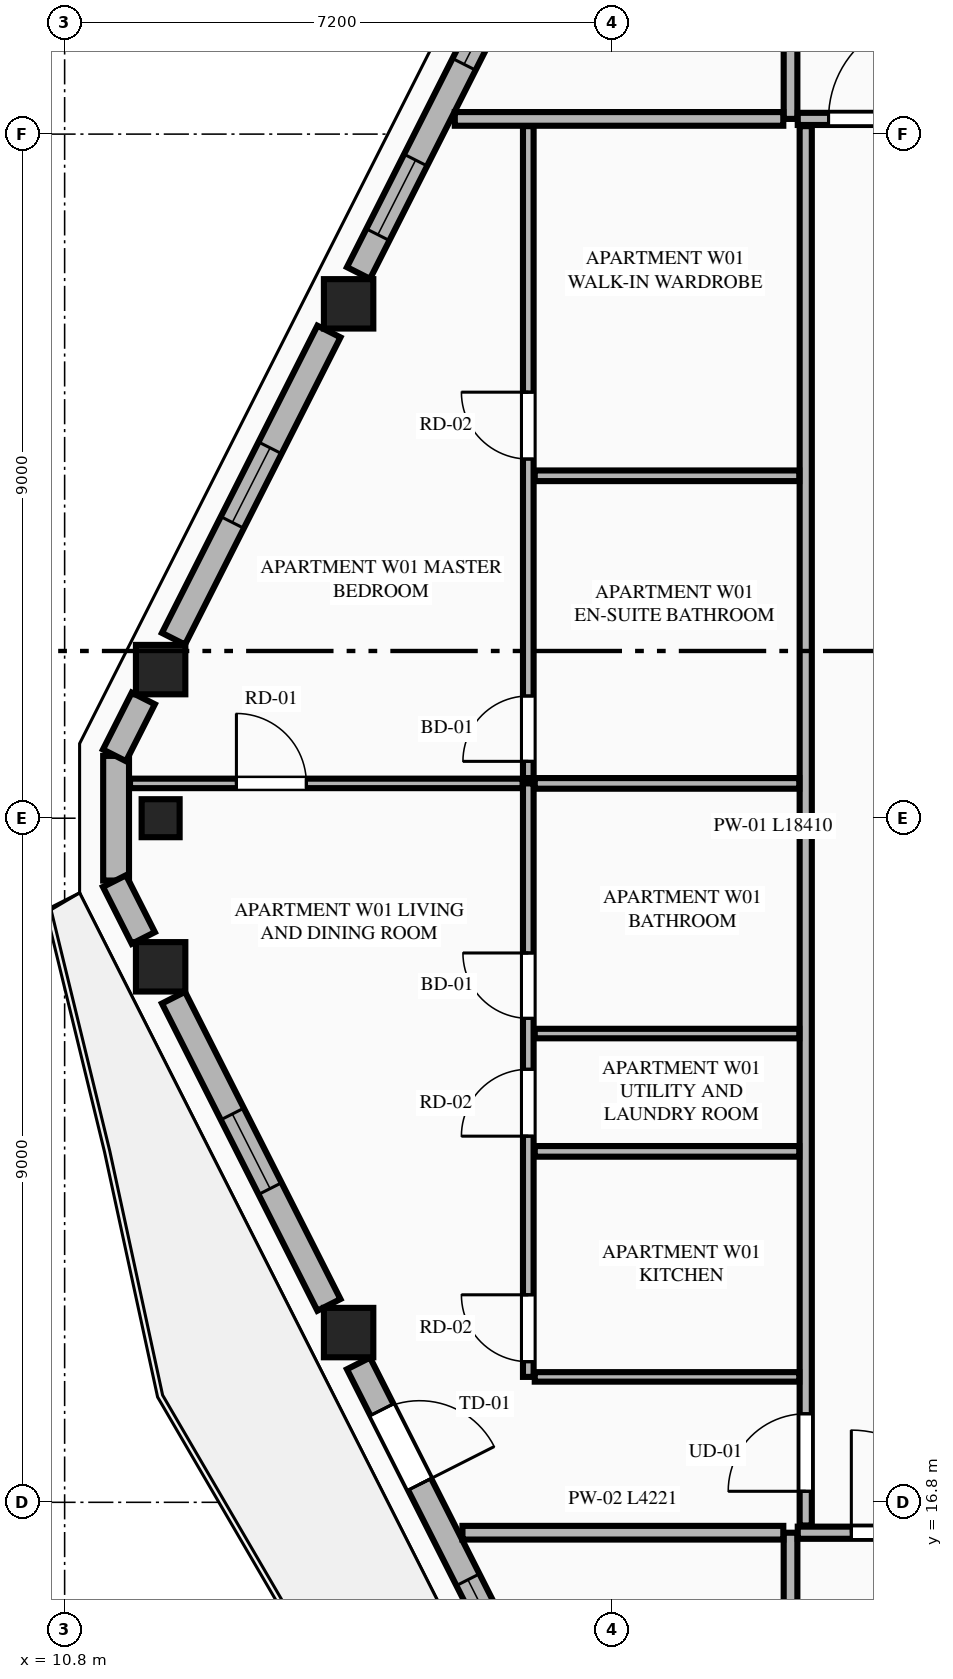
"""IFC4 building model, lengths in metres.
Left out: names, types, materials, properties, quantities, classifications, styles, units other than length and angle.
Written with IfcOpenShell. Run it as: python <this file> out.ifc"""

import sys

from ifc_helpers import new_model, si_unit, direction, frame, frame_2d, origin, origin_2d, place, context, subcontext, project, spatial, rectangle, extrude, element, fill, save


model = new_model("IFC4")
c1 = context("Model", 3, precision=1e-05, world=origin(), true_north=direction((0.0, 1.0)))
c2 = subcontext(c1, "Body", "Model", "MODEL_VIEW")
j1 = project(units=[si_unit("LENGTHUNIT", "METRE"), si_unit("PLANEANGLEUNIT", "RADIAN")], contexts=[c1])
p1 = place(None, origin())
s1 = spatial("IfcSite", under=j1, at=p1, CompositionType="ELEMENT")
p2 = place(p1, origin())
s2 = spatial("IfcBuilding", under=s1, at=p2, CompositionType="ELEMENT")
p3 = place(p2, frame((0.0, 0.0, 291.5)))
s3 = spatial("IfcBuildingStorey", under=s2, at=p3, CompositionType="ELEMENT", Elevation=291.5)
for number, where, z_axis, x_axis in (
    (1, (14.536, 32.567, 0.0), (0.0, 0.0, 1.0), (1.0, 0.0, 0.0)),
    (2, (12.063, 27.755, 0.0), (0.0, 0.0, 1.0), (1.0, 0.0, 0.0)),
    (3, (12.063, 23.845, 0.0), (0.0, 0.0, 1.0), (1.0, 0.0, 0.0)),
    (4, (14.536, 19.033, 0.0), (0.0, 0.0, 1.0), (1.0, 0.0, 0.0)),
):
    element("IfcColumn", number, at=place(p3, frame(where, z_axis=z_axis, x_axis=x_axis)), inside=s3, PredefinedType="COLUMN", context=c2, shape_type="SweptSolid", body=[
        extrude(rectangle(XDim=0.65, YDim=0.65, at=origin_2d()), origin(), (0.0, 0.0, 1.0), 4.0),
    ])
p4 = place(p3, frame((12.063, 25.8, 0.0), z_axis=(0.0, 0.0, 1.0), x_axis=(0.0, -1.0, 0.0)))
e5 = element("IfcColumn", 5, at=p4, inside=s3, PredefinedType="PILASTER", context=c2, shape_type="SweptSolid", body=[
    extrude(rectangle(XDim=0.5, YDim=0.35, at=origin_2d()), origin(), (0.0, 0.0, 1.0), 4.0),
])
p5 = place(p3, frame((11.477, 26.62, 0.0), z_axis=(0.0, 0.0, 1.0), x_axis=(0.0, -1.0, 0.0)))
e6 = element("IfcWall", 6, at=p5, inside=s3, PredefinedType="STANDARD", context=c2, shape_type="SweptSolid", body=[
    extrude(rectangle(XDim=1.64, YDim=0.34, at=frame_2d((0.82, 0.0))), origin(), (0.0, 0.0, 1.0), 3.8),
])
p6 = place(p3, frame((16.798, 37.187, 0.0), z_axis=(0.0, 0.0, 1.0), x_axis=(-0.451447516904, -0.892297674255, 0.0)))
e7 = element("IfcWall", 7, at=p6, inside=s3, PredefinedType="STANDARD", context=c2, shape_type="SweptSolid", body=[
    extrude(rectangle(XDim=4.723, YDim=0.34, at=frame_2d((2.361, 0.0))), origin(), (0.0, 0.0, 1.0), 2.99),
])
p7 = place(p6, frame((0.546, 0.0, 0.75)))
e8 = element("IfcOpeningElement", 8, at=p7, cuts=e7, PredefinedType="OPENING", context=c2, shape_type="SweptSolid", body=[
    extrude(rectangle(XDim=1.1, YDim=2.0, at=frame_2d((0.55, 1.0))), frame((0.0, 0.18, 0.0), z_axis=(0.0, -1.0, 0.0), x_axis=(1.0, 0.0, 0.0)), (0.0, 0.0, 1.0), 0.36),
])
p8 = place(p6, frame((3.058, 0.0, 0.75)))
e9 = element("IfcOpeningElement", 9, at=p8, cuts=e7, PredefinedType="OPENING", context=c2, shape_type="SweptSolid", body=[
    extrude(rectangle(XDim=1.1, YDim=2.0, at=frame_2d((0.55, 1.0))), frame((0.0, 0.18, 0.0), z_axis=(0.0, -1.0, 0.0), x_axis=(1.0, 0.0, 0.0)), (0.0, 0.0, 1.0), 0.36),
])
p9 = place(p3, frame((14.277, 32.203, 0.0), z_axis=(0.0, 0.0, 1.0), x_axis=(-0.45147697324, -0.892282770558, 0.0)))
e10 = element("IfcWall", 10, at=p9, inside=s3, PredefinedType="STANDARD", context=c2, shape_type="SweptSolid", body=[
    extrude(rectangle(XDim=4.53, YDim=0.34, at=frame_2d((2.265, 0.0))), origin(), (0.0, 0.0, 1.0), 2.99),
])
p10 = place(p9, frame((1.715, 0.0, 0.75)))
e11 = element("IfcOpeningElement", 11, at=p10, cuts=e10, PredefinedType="OPENING", context=c2, shape_type="SweptSolid", body=[
    extrude(rectangle(XDim=1.1, YDim=2.0, at=frame_2d((0.55, 1.0))), frame((0.0, 0.18, 0.0), z_axis=(0.0, -1.0, 0.0), x_axis=(1.0, 0.0, 0.0)), (0.0, 0.0, 1.0), 0.36),
])
p11 = place(p3, frame((11.835, 27.376, 0.0), z_axis=(0.0, 0.0, 1.0), x_axis=(-0.45139691133, -0.892323275748, 0.0)))
e12 = element("IfcWall", 12, at=p11, inside=s3, PredefinedType="STANDARD", context=c2, shape_type="SweptSolid", body=[
    extrude(rectangle(XDim=0.839, YDim=0.34, at=frame_2d((0.42, 0.0))), origin(), (0.0, 0.0, 1.0), 3.8),
])
p12 = place(p3, frame((11.456, 24.973, 0.0), z_axis=(0.0, 0.0, 1.0), x_axis=(0.4515140893, -0.892263989615, 0.0)))
e13 = element("IfcWall", 13, at=p12, inside=s3, PredefinedType="STANDARD", context=c2, shape_type="SweptSolid", body=[
    extrude(rectangle(XDim=0.839, YDim=0.34, at=frame_2d((0.419, 0.0))), origin(), (0.0, 0.0, 1.0), 3.8),
])
p13 = place(p3, frame((12.232, 23.439, 0.0), z_axis=(0.0, 0.0, 1.0), x_axis=(0.45147697324, -0.892282770558, 0.0)))
e14 = element("IfcWall", 14, at=p13, inside=s3, PredefinedType="STANDARD", context=c2, shape_type="SweptSolid", body=[
    extrude(rectangle(XDim=4.53, YDim=0.34, at=frame_2d((2.265, 0.0))), origin(), (0.0, 0.0, 1.0), 2.99),
])
p14 = place(p13, frame((1.715, 0.0, 0.75)))
e15 = element("IfcOpeningElement", 15, at=p14, cuts=e14, PredefinedType="OPENING", context=c2, shape_type="SweptSolid", body=[
    extrude(rectangle(XDim=1.1, YDim=2.0, at=frame_2d((0.55, 1.0))), frame((0.0, 0.18, 0.0), z_axis=(0.0, -1.0, 0.0), x_axis=(1.0, 0.0, 0.0)), (0.0, 0.0, 1.0), 0.36),
])
p15 = place(p3, frame((14.666, 18.627, 0.0), z_axis=(0.0, 0.0, 1.0), x_axis=(0.451468341582, -0.892287137949, 0.0)))
e16 = element("IfcWall", 16, at=p15, inside=s3, PredefinedType="STANDARD", context=c2, shape_type="SweptSolid", body=[
    extrude(rectangle(XDim=4.723, YDim=0.34, at=frame_2d((2.361, 0.0))), origin(), (0.0, 0.0, 1.0), 2.99),
])
p16 = place(p15, frame((0.682, 0.0, 0.0)))
e17 = element("IfcOpeningElement", 17, at=p16, cuts=e16, PredefinedType="OPENING", context=c2, shape_type="SweptSolid", body=[
    extrude(rectangle(XDim=1.1, YDim=2.25, at=frame_2d((0.55, 1.125))), frame((0.0, 0.18, 0.0), z_axis=(0.0, -1.0, 0.0), x_axis=(1.0, 0.0, 0.0)), (0.0, 0.0, 1.0), 0.36),
])
p17 = place(p15, frame((3.189, 0.0, 0.75)))
e18 = element("IfcOpeningElement", 18, at=p17, cuts=e16, PredefinedType="OPENING", context=c2, shape_type="SweptSolid", body=[
    extrude(rectangle(XDim=1.1, YDim=2.0, at=frame_2d((0.55, 1.0))), frame((0.0, 0.18, 0.0), z_axis=(0.0, -1.0, 0.0), x_axis=(1.0, 0.0, 0.0)), (0.0, 0.0, 1.0), 0.36),
])
p18 = place(p3, frame((20.35, 8.119, 0.0), z_axis=(0.0, 0.0, 1.0), x_axis=(0.0, 1.0, 0.0)))
e19 = element("IfcWall", 19, at=p18, inside=s3, PredefinedType="PARTITIONING", context=c2, shape_type="SweptSolid", body=[
    extrude(rectangle(XDim=8.281, YDim=0.18, at=frame_2d((4.141, 0.0))), origin(), (0.0, 0.0, 1.0), 3.8),
])
p19 = place(p3, frame((20.445, 16.4, 0.0), z_axis=(0.0, 0.0, 1.0), x_axis=(1.0, 0.0, 0.0)))
e20 = element("IfcWall", 20, at=p19, inside=s3, PredefinedType="PARTITIONING", context=c2, shape_type="SweptSolid", body=[
    extrude(rectangle(XDim=23.91, YDim=0.16, at=frame_2d((11.955, 0.0))), origin(), (0.0, 0.0, 1.0), 3.8),
])
p20 = place(p19, frame((0.705, 0.0, 0.0)))
e21 = element("IfcOpeningElement", 21, at=p20, cuts=e20, PredefinedType="OPENING", context=c2, shape_type="SweptSolid", body=[
    extrude(rectangle(XDim=1.35, YDim=2.35, at=frame_2d((0.675, 1.175))), frame((0.0, 0.09, 0.0), z_axis=(0.0, -1.0, 0.0), x_axis=(1.0, 0.0, 0.0)), (0.0, 0.0, 1.0), 0.18),
])
p21 = place(p3, frame((20.35, 35.0, 0.0), z_axis=(0.0, 0.0, 1.0), x_axis=(0.0, 1.0, 0.0)))
e22 = element("IfcWall", 22, at=p21, inside=s3, PredefinedType="PARTITIONING", context=c2, shape_type="SweptSolid", body=[
    extrude(rectangle(XDim=8.481, YDim=0.18, at=frame_2d((4.24, 0.0))), origin(), (0.0, 0.0, 1.0), 3.8),
])
p22 = place(p3, frame((20.445, 35.0, 0.0), z_axis=(0.0, 0.0, 1.0), x_axis=(1.0, 0.0, 0.0)))
e23 = element("IfcWall", 23, at=p22, inside=s3, PredefinedType="PARTITIONING", context=c2, shape_type="SweptSolid", body=[
    extrude(rectangle(XDim=23.91, YDim=0.16, at=frame_2d((11.955, 0.0))), origin(), (0.0, 0.0, 1.0), 3.8),
])
p23 = place(p22, frame((0.405, 0.0, 0.0)))
e24 = element("IfcOpeningElement", 24, at=p23, cuts=e23, PredefinedType="OPENING", context=c2, shape_type="SweptSolid", body=[
    extrude(rectangle(XDim=1.35, YDim=2.35, at=frame_2d((0.675, 1.175))), frame((0.0, 0.09, 0.0), z_axis=(0.0, -1.0, 0.0), x_axis=(1.0, 0.0, 0.0)), (0.0, 0.0, 1.0), 0.18),
])
p24 = place(p3, frame((16.034, 16.4, 0.0), z_axis=(0.0, 0.0, 1.0), x_axis=(1.0, 0.0, 0.0)))
e25 = element("IfcWall", 25, at=p24, inside=s3, PredefinedType="PARTITIONING", context=c2, shape_type="SweptSolid", body=[
    extrude(rectangle(XDim=4.221, YDim=0.18, at=frame_2d((2.11, 0.0))), origin(), (0.0, 0.0, 1.0), 3.8),
])
p25 = place(p3, frame((15.933, 35.0, 0.0), z_axis=(0.0, 0.0, 1.0), x_axis=(1.0, 0.0, 0.0)))
e26 = element("IfcWall", 26, at=p25, inside=s3, PredefinedType="PARTITIONING", context=c2, shape_type="SweptSolid", body=[
    extrude(rectangle(XDim=4.322, YDim=0.18, at=frame_2d((2.161, 0.0))), origin(), (0.0, 0.0, 1.0), 3.8),
])
p26 = place(p3, frame((20.55, 16.495, 0.0), z_axis=(0.0, 0.0, 1.0), x_axis=(0.0, 1.0, 0.0)))
e27 = element("IfcWall", 27, at=p26, inside=s3, PredefinedType="PARTITIONING", context=c2, shape_type="SweptSolid", body=[
    extrude(rectangle(XDim=18.41, YDim=0.16, at=frame_2d((9.205, 0.0))), origin(), (0.0, 0.0, 1.0), 3.487),
])
p27 = place(p26, frame((0.45, 0.0, 0.0)))
e28 = element("IfcOpeningElement", 28, at=p27, cuts=e27, PredefinedType="OPENING", context=c2, shape_type="SweptSolid", body=[
    extrude(rectangle(XDim=1.02, YDim=2.25, at=frame_2d((0.51, 1.125))), frame((0.0, 0.09, 0.0), z_axis=(0.0, -1.0, 0.0), x_axis=(1.0, 0.0, 0.0)), (0.0, 0.0, 1.0), 0.18),
])
p28 = place(p3, frame((16.985, 18.45, 0.0), z_axis=(0.0, 0.0, 1.0), x_axis=(1.0, 0.0, 0.0)))
e29 = element("IfcWall", 29, at=p28, inside=s3, PredefinedType="PARTITIONING", context=c2, shape_type="SweptSolid", body=[
    extrude(rectangle(XDim=3.48, YDim=0.125, at=frame_2d((1.74, 0.0))), origin(), (0.0, 0.0, 1.0), 3.8),
])
p29 = place(p3, frame((16.9, 18.45, 0.0), z_axis=(0.0, 0.0, 1.0), x_axis=(0.0, 1.0, 0.0)))
e30 = element("IfcWall", 30, at=p29, inside=s3, PredefinedType="PLUMBINGWALL", context=c2, shape_type="SweptSolid", body=[
    extrude(rectangle(XDim=7.808, YDim=0.14, at=frame_2d((3.904, 0.0))), origin(), (0.0, 0.0, 1.0), 3.8),
])
p30 = place(p29, frame((0.2, 0.0, 0.0)))
e31 = element("IfcOpeningElement", 31, at=p30, cuts=e30, PredefinedType="OPENING", context=c2, shape_type="SweptSolid", body=[
    extrude(rectangle(XDim=0.88, YDim=2.15, at=frame_2d((0.44, 1.075))), frame((0.0, 0.08, 0.0), z_axis=(0.0, -1.0, 0.0), x_axis=(1.0, 0.0, 0.0)), (0.0, 0.0, 1.0), 0.16),
])
p31 = place(p29, frame((3.167, 0.0, 0.0)))
e32 = element("IfcOpeningElement", 32, at=p31, cuts=e30, PredefinedType="OPENING", context=c2, shape_type="SweptSolid", body=[
    extrude(rectangle(XDim=0.88, YDim=2.15, at=frame_2d((0.44, 1.075))), frame((0.0, 0.08, 0.0), z_axis=(0.0, -1.0, 0.0), x_axis=(1.0, 0.0, 0.0)), (0.0, 0.0, 1.0), 0.16),
])
p32 = place(p29, frame((4.717, 0.0, 0.0)))
e33 = element("IfcOpeningElement", 33, at=p32, cuts=e30, PredefinedType="OPENING", context=c2, shape_type="SweptSolid", body=[
    extrude(rectangle(XDim=0.86, YDim=2.1, at=frame_2d((0.43, 1.05))), frame((0.0, 0.08, 0.0), z_axis=(0.0, -1.0, 0.0), x_axis=(1.0, 0.0, 0.0)), (0.0, 0.0, 1.0), 0.16),
])
p33 = place(p3, frame((16.9, 26.328, 0.0), z_axis=(0.0, 0.0, 1.0), x_axis=(0.0, 1.0, 0.0)))
e34 = element("IfcWall", 34, at=p33, inside=s3, PredefinedType="PLUMBINGWALL", context=c2, shape_type="SweptSolid", body=[
    extrude(rectangle(XDim=8.577, YDim=0.14, at=frame_2d((4.289, 0.0))), origin(), (0.0, 0.0, 1.0), 3.8),
])
p34 = place(p33, frame((0.22, 0.0, 0.0)))
e35 = element("IfcOpeningElement", 35, at=p34, cuts=e34, PredefinedType="OPENING", context=c2, shape_type="SweptSolid", body=[
    extrude(rectangle(XDim=0.86, YDim=2.1, at=frame_2d((0.43, 1.05))), frame((0.0, 0.08, 0.0), z_axis=(0.0, -1.0, 0.0), x_axis=(1.0, 0.0, 0.0)), (0.0, 0.0, 1.0), 0.16),
])
p35 = place(p33, frame((4.197, 0.0, 0.0)))
e36 = element("IfcOpeningElement", 36, at=p35, cuts=e34, PredefinedType="OPENING", context=c2, shape_type="SweptSolid", body=[
    extrude(rectangle(XDim=0.88, YDim=2.15, at=frame_2d((0.44, 1.075))), frame((0.0, 0.08, 0.0), z_axis=(0.0, -1.0, 0.0), x_axis=(1.0, 0.0, 0.0)), (0.0, 0.0, 1.0), 0.16),
])
p36 = place(p3, frame((16.985, 26.258, 0.0), z_axis=(0.0, 0.0, 1.0), x_axis=(1.0, 0.0, 0.0)))
e37 = element("IfcWall", 37, at=p36, inside=s3, PredefinedType="PLUMBINGWALL", context=c2, shape_type="SweptSolid", body=[
    extrude(rectangle(XDim=3.48, YDim=0.14, at=frame_2d((1.74, 0.0))), origin(), (0.0, 0.0, 1.0), 3.8),
])
p37 = place(p3, frame((11.66, 26.258, 0.0), z_axis=(0.0, 0.0, 1.0), x_axis=(1.0, 0.0, 0.0)))
e38 = element("IfcWall", 38, at=p37, inside=s3, PredefinedType="PARTITIONING", context=c2, shape_type="SweptSolid", body=[
    extrude(rectangle(XDim=5.165, YDim=0.125, at=frame_2d((2.583, 0.0))), origin(), (0.0, 0.0, 1.0), 3.8),
])
p38 = place(p37, frame((1.4, 0.0, 0.0)))
e39 = element("IfcOpeningElement", 39, at=p38, cuts=e38, PredefinedType="OPENING", context=c2, shape_type="SweptSolid", body=[
    extrude(rectangle(XDim=0.92, YDim=2.15, at=frame_2d((0.46, 1.075))), frame((0.0, 0.073, 0.0), z_axis=(0.0, -1.0, 0.0), x_axis=(1.0, 0.0, 0.0)), (0.0, 0.0, 1.0), 0.145),
])
p39 = place(p3, frame((16.985, 21.417, 0.0), z_axis=(0.0, 0.0, 1.0), x_axis=(1.0, 0.0, 0.0)))
e40 = element("IfcWall", 40, at=p39, inside=s3, PredefinedType="PLUMBINGWALL", context=c2, shape_type="SweptSolid", body=[
    extrude(rectangle(XDim=3.48, YDim=0.14, at=frame_2d((1.74, 0.0))), origin(), (0.0, 0.0, 1.0), 3.8),
])
p40 = place(p3, frame((16.985, 22.967, 0.0), z_axis=(0.0, 0.0, 1.0), x_axis=(1.0, 0.0, 0.0)))
e41 = element("IfcWall", 41, at=p40, inside=s3, PredefinedType="PARTITIONING", context=c2, shape_type="SweptSolid", body=[
    extrude(rectangle(XDim=3.48, YDim=0.125, at=frame_2d((1.74, 0.0))), origin(), (0.0, 0.0, 1.0), 3.8),
])
p41 = place(p3, frame((16.985, 30.305, 0.0), z_axis=(0.0, 0.0, 1.0), x_axis=(1.0, 0.0, 0.0)))
e42 = element("IfcWall", 42, at=p41, inside=s3, PredefinedType="PLUMBINGWALL", context=c2, shape_type="SweptSolid", body=[
    extrude(rectangle(XDim=3.48, YDim=0.14, at=frame_2d((1.74, 0.0))), origin(), (0.0, 0.0, 1.0), 3.8),
])
p42 = place(p7, origin())
e43 = element("IfcWindow", 43, at=p42, inside=s3, PartitioningType="SINGLE_PANEL", PredefinedType="WINDOW", context=c2, shape_type="SweptSolid", body=[
    extrude(rectangle(XDim=1.1, YDim=2.0, at=frame_2d((0.55, 1.0))), frame((0.0, 0.03, 0.0), z_axis=(0.0, -1.0, 0.0), x_axis=(1.0, 0.0, 0.0)), (0.0, 0.0, 1.0), 0.06),
])
fill(e8, e43)
p43 = place(p10, origin())
e44 = element("IfcWindow", 44, at=p43, inside=s3, PartitioningType="SINGLE_PANEL", PredefinedType="WINDOW", context=c2, shape_type="SweptSolid", body=[
    extrude(rectangle(XDim=1.1, YDim=2.0, at=frame_2d((0.55, 1.0))), frame((0.0, 0.03, 0.0), z_axis=(0.0, -1.0, 0.0), x_axis=(1.0, 0.0, 0.0)), (0.0, 0.0, 1.0), 0.06),
])
fill(e11, e44)
p44 = place(p14, origin())
e45 = element("IfcWindow", 45, at=p44, inside=s3, PartitioningType="SINGLE_PANEL", PredefinedType="WINDOW", context=c2, shape_type="SweptSolid", body=[
    extrude(rectangle(XDim=1.1, YDim=2.0, at=frame_2d((0.55, 1.0))), frame((0.0, 0.03, 0.0), z_axis=(0.0, -1.0, 0.0), x_axis=(1.0, 0.0, 0.0)), (0.0, 0.0, 1.0), 0.06),
])
fill(e15, e45)
p45 = place(p16, origin())
e46 = element("IfcDoor", 46, at=p45, inside=s3, OperationType="SINGLE_SWING_RIGHT", PredefinedType="DOOR", context=c2, shape_type="SweptSolid", body=[
    extrude(rectangle(XDim=1.1, YDim=2.25, at=frame_2d((0.55, 1.125))), frame((0.0, 0.025, 0.0), z_axis=(0.0, -1.0, 0.0), x_axis=(1.0, 0.0, 0.0)), (0.0, 0.0, 1.0), 0.05),
])
fill(e17, e46)
p46 = place(p20, origin())
e47 = element("IfcDoor", 47, at=p46, inside=s3, OperationType="SINGLE_SWING_LEFT", PredefinedType="DOOR", context=c2, shape_type="SweptSolid", body=[
    extrude(rectangle(XDim=1.35, YDim=2.35, at=frame_2d((0.675, 1.175))), frame((0.0, 0.025, 0.0), z_axis=(0.0, -1.0, 0.0), x_axis=(1.0, 0.0, 0.0)), (0.0, 0.0, 1.0), 0.05),
])
fill(e21, e47)
p47 = place(p23, origin())
e48 = element("IfcDoor", 48, at=p47, inside=s3, OperationType="SINGLE_SWING_RIGHT", PredefinedType="DOOR", context=c2, shape_type="SweptSolid", body=[
    extrude(rectangle(XDim=1.35, YDim=2.35, at=frame_2d((0.675, 1.175))), frame((0.0, 0.025, 0.0), z_axis=(0.0, -1.0, 0.0), x_axis=(1.0, 0.0, 0.0)), (0.0, 0.0, 1.0), 0.05),
])
fill(e24, e48)
p48 = place(p30, origin())
e49 = element("IfcDoor", 49, at=p48, inside=s3, OperationType="SINGLE_SWING_RIGHT", PredefinedType="DOOR", context=c2, shape_type="SweptSolid", body=[
    extrude(rectangle(XDim=0.88, YDim=2.15, at=frame_2d((0.44, 1.075))), frame((0.0, 0.025, 0.0), z_axis=(0.0, -1.0, 0.0), x_axis=(1.0, 0.0, 0.0)), (0.0, 0.0, 1.0), 0.05),
])
fill(e31, e49)
p49 = place(p31, origin())
e50 = element("IfcDoor", 50, at=p49, inside=s3, OperationType="SINGLE_SWING_LEFT", PredefinedType="DOOR", context=c2, shape_type="SweptSolid", body=[
    extrude(rectangle(XDim=0.88, YDim=2.15, at=frame_2d((0.44, 1.075))), frame((0.0, 0.025, 0.0), z_axis=(0.0, -1.0, 0.0), x_axis=(1.0, 0.0, 0.0)), (0.0, 0.0, 1.0), 0.05),
])
fill(e32, e50)
p50 = place(p32, origin())
e51 = element("IfcDoor", 51, at=p50, inside=s3, OperationType="SINGLE_SWING_RIGHT", PredefinedType="DOOR", context=c2, shape_type="SweptSolid", body=[
    extrude(rectangle(XDim=0.86, YDim=2.1, at=frame_2d((0.43, 1.05))), frame((0.0, 0.025, 0.0), z_axis=(0.0, -1.0, 0.0), x_axis=(1.0, 0.0, 0.0)), (0.0, 0.0, 1.0), 0.05),
])
fill(e33, e51)
p51 = place(p34, origin())
e52 = element("IfcDoor", 52, at=p51, inside=s3, OperationType="SINGLE_SWING_LEFT", PredefinedType="DOOR", context=c2, shape_type="SweptSolid", body=[
    extrude(rectangle(XDim=0.86, YDim=2.1, at=frame_2d((0.43, 1.05))), frame((0.0, 0.025, 0.0), z_axis=(0.0, -1.0, 0.0), x_axis=(1.0, 0.0, 0.0)), (0.0, 0.0, 1.0), 0.05),
])
fill(e35, e52)
p52 = place(p35, origin())
e53 = element("IfcDoor", 53, at=p52, inside=s3, OperationType="SINGLE_SWING_RIGHT", PredefinedType="DOOR", context=c2, shape_type="SweptSolid", body=[
    extrude(rectangle(XDim=0.88, YDim=2.15, at=frame_2d((0.44, 1.075))), frame((0.0, 0.025, 0.0), z_axis=(0.0, -1.0, 0.0), x_axis=(1.0, 0.0, 0.0)), (0.0, 0.0, 1.0), 0.05),
])
fill(e36, e53)
p53 = place(p27, origin())
e54 = element("IfcDoor", 54, at=p53, inside=s3, OperationType="SINGLE_SWING_LEFT", PredefinedType="DOOR", context=c2, shape_type="SweptSolid", body=[
    extrude(rectangle(XDim=1.02, YDim=2.25, at=frame_2d((0.51, 1.125))), frame((0.0, 0.025, 0.0), z_axis=(0.0, -1.0, 0.0), x_axis=(1.0, 0.0, 0.0)), (0.0, 0.0, 1.0), 0.05),
])
fill(e28, e54)
p54 = place(p38, origin())
e55 = element("IfcDoor", 55, at=p54, inside=s3, OperationType="SINGLE_SWING_LEFT", PredefinedType="DOOR", context=c2, shape_type="SweptSolid", body=[
    extrude(rectangle(XDim=0.92, YDim=2.15, at=frame_2d((0.46, 1.075))), frame((0.0, 0.025, 0.0), z_axis=(0.0, -1.0, 0.0), x_axis=(1.0, 0.0, 0.0)), (0.0, 0.0, 1.0), 0.05),
])
fill(e39, e55)
p55 = place(p8, origin())
e56 = element("IfcWindow", 56, at=p55, inside=s3, PartitioningType="SINGLE_PANEL", PredefinedType="WINDOW", context=c2, shape_type="SweptSolid", body=[
    extrude(rectangle(XDim=1.1, YDim=2.0, at=frame_2d((0.55, 1.0))), frame((0.0, 0.03, 0.0), z_axis=(0.0, -1.0, 0.0), x_axis=(1.0, 0.0, 0.0)), (0.0, 0.0, 1.0), 0.06),
])
fill(e9, e56)
p56 = place(p17, origin())
e57 = element("IfcWindow", 57, at=p56, inside=s3, PartitioningType="SINGLE_PANEL", PredefinedType="WINDOW", context=c2, shape_type="SweptSolid", body=[
    extrude(rectangle(XDim=1.1, YDim=2.0, at=frame_2d((0.55, 1.0))), frame((0.0, 0.03, 0.0), z_axis=(0.0, -1.0, 0.0), x_axis=(1.0, 0.0, 0.0)), (0.0, 0.0, 1.0), 0.06),
])
fill(e18, e57)
save(model, sys.argv[1])
